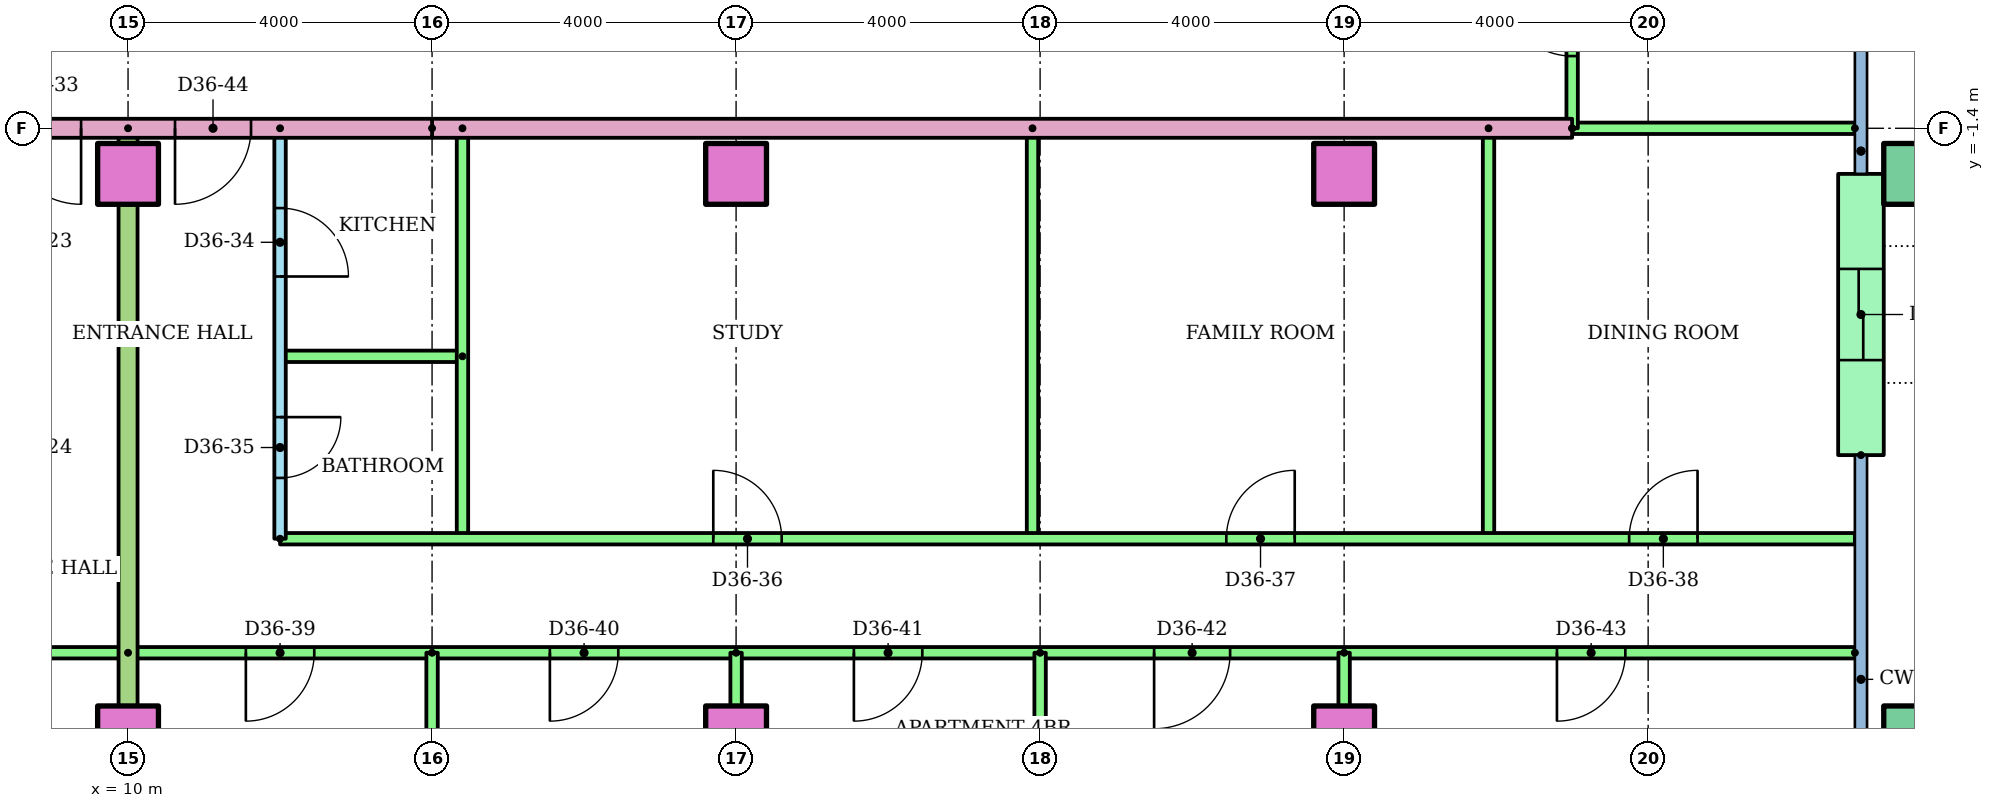
"""IFC4 building model, lengths in metres.
Left out: names, types, materials, properties, quantities, classifications, styles, units other than length and angle.
Written with IfcOpenShell. Run it as: python <this file> out.ifc"""

import sys

from ifc_helpers import new_model, si_unit, direction, frame, frame_2d, origin, origin_2d, place, context, subcontext, project, spatial, rectangle, hollow_rectangle, extrude, element, fill, save


model = new_model("IFC4")
c1 = context("Model", 3, precision=1e-05, world=origin(), true_north=direction((0.0, 1.0)))
c2 = subcontext(c1, "Body", "Model", "MODEL_VIEW")
j1 = project(units=[si_unit("LENGTHUNIT", "METRE"), si_unit("PLANEANGLEUNIT", "RADIAN")], contexts=[c1])
p1 = place(None, origin())
s1 = spatial("IfcSite", under=j1, at=p1, CompositionType="ELEMENT")
p2 = place(p1, origin())
s2 = spatial("IfcBuilding", under=s1, at=p2, CompositionType="ELEMENT")
p3 = place(p2, frame((0.0, 0.0, 139.0)))
s3 = spatial("IfcBuildingStorey", under=s2, at=p3, CompositionType="ELEMENT", Elevation=139.0)
for number, where in (
    (1, (10.0, -9.4, 0.0)),
    (2, (18.0, -9.4, 0.0)),
    (3, (26.0, -9.4, 0.0)),
):
    element("IfcColumn", number, at=place(p3, frame(where)), inside=s3, PredefinedType="COLUMN", context=c2, shape_type="SweptSolid", body=[
        extrude(rectangle(XDim=0.8, YDim=0.8, at=origin_2d()), origin(), (0.0, 0.0, 1.0), 3.2),
    ])
p4 = place(p3, frame((33.5, -9.4, 0.0)))
e4 = element("IfcColumn", 4, at=p4, inside=s3, PredefinedType="COLUMN", context=c2, shape_type="SweptSolid", body=[
    extrude(hollow_rectangle(XDim=0.8, YDim=0.8, WallThickness=0.04, at=origin_2d()), origin(), (0.0, 0.0, 1.0), 3.2),
])
for number, where in (
    (5, (10.0, -2.0, 0.0)),
    (6, (18.0, -2.0, 0.0)),
    (7, (26.0, -2.0, 0.0)),
):
    element("IfcColumn", number, at=place(p3, frame(where)), inside=s3, PredefinedType="COLUMN", context=c2, shape_type="SweptSolid", body=[
        extrude(rectangle(XDim=0.8, YDim=0.8, at=origin_2d()), origin(), (0.0, 0.0, 1.0), 3.2),
    ])
p5 = place(p3, frame((33.5, -2.0, 0.0)))
e8 = element("IfcColumn", 8, at=p5, inside=s3, PredefinedType="COLUMN", context=c2, shape_type="SweptSolid", body=[
    extrude(hollow_rectangle(XDim=0.8, YDim=0.8, WallThickness=0.04, at=origin_2d()), origin(), (0.0, 0.0, 1.0), 3.2),
])
p6 = place(p3, frame((32.8, -5.7, 0.0), z_axis=(0.0, 0.0, 1.0), x_axis=(0.0, 1.0, 0.0)))
e9 = element("IfcWall", 9, at=p6, inside=s3, PredefinedType="STANDARD", context=c2, shape_type="SweptSolid", body=[
    extrude(rectangle(XDim=3.7, YDim=0.6, at=frame_2d((1.85, 0.0))), origin(), (0.0, 0.0, 1.0), 2.92),
])
p7 = place(p6, frame((1.25, 0.0, 0.0)))
e10 = element("IfcOpeningElement", 10, at=p7, cuts=e9, PredefinedType="OPENING", context=c2, shape_type="SweptSolid", body=[
    extrude(rectangle(XDim=1.2, YDim=2.1, at=frame_2d((0.6, 1.05))), frame((0.0, 0.31, 0.0), z_axis=(0.0, -1.0, 0.0), x_axis=(1.0, 0.0, 0.0)), (0.0, 0.0, 1.0), 0.62),
])
p8 = place(p3, frame((10.0, -8.3, 0.0), z_axis=(0.0, 0.0, 1.0), x_axis=(-1.0, 0.0, 0.0)))
e11 = element("IfcWall", 11, at=p8, inside=s3, PredefinedType="PARTITIONING", context=c2, shape_type="SweptSolid", body=[
    extrude(rectangle(XDim=24.0, YDim=0.15, at=frame_2d((12.0, 0.0))), origin(), (0.0, 0.0, 1.0), 2.4),
])
p9 = place(p8, frame((19.5, 0.0, 0.0)))
e12 = element("IfcOpeningElement", 12, at=p9, cuts=e11, PredefinedType="OPENING", context=c2, shape_type="SweptSolid", body=[
    extrude(rectangle(XDim=1.0, YDim=2.1, at=frame_2d((0.5, 1.05))), frame((0.0, 0.085, 0.0), z_axis=(0.0, -1.0, 0.0), x_axis=(1.0, 0.0, 0.0)), (0.0, 0.0, 1.0), 0.17),
])
p10 = place(p8, frame((13.55, 0.0, 0.0)))
e13 = element("IfcOpeningElement", 13, at=p10, cuts=e11, PredefinedType="OPENING", context=c2, shape_type="SweptSolid", body=[
    extrude(rectangle(XDim=0.9, YDim=2.1, at=frame_2d((0.45, 1.05))), frame((0.0, 0.085, 0.0), z_axis=(0.0, -1.0, 0.0), x_axis=(1.0, 0.0, 0.0)), (0.0, 0.0, 1.0), 0.17),
])
p11 = place(p8, frame((9.55, 0.0, 0.0)))
e14 = element("IfcOpeningElement", 14, at=p11, cuts=e11, PredefinedType="OPENING", context=c2, shape_type="SweptSolid", body=[
    extrude(rectangle(XDim=0.9, YDim=2.1, at=frame_2d((0.45, 1.05))), frame((0.0, 0.085, 0.0), z_axis=(0.0, -1.0, 0.0), x_axis=(1.0, 0.0, 0.0)), (0.0, 0.0, 1.0), 0.17),
])
p12 = place(p8, frame((5.55, 0.0, 0.0)))
e15 = element("IfcOpeningElement", 15, at=p12, cuts=e11, PredefinedType="OPENING", context=c2, shape_type="SweptSolid", body=[
    extrude(rectangle(XDim=0.9, YDim=2.1, at=frame_2d((0.45, 1.05))), frame((0.0, 0.085, 0.0), z_axis=(0.0, -1.0, 0.0), x_axis=(1.0, 0.0, 0.0)), (0.0, 0.0, 1.0), 0.17),
])
p13 = place(p8, frame((1.55, 0.0, 0.0)))
e16 = element("IfcOpeningElement", 16, at=p13, cuts=e11, PredefinedType="OPENING", context=c2, shape_type="SweptSolid", body=[
    extrude(rectangle(XDim=0.9, YDim=2.1, at=frame_2d((0.45, 1.05))), frame((0.0, 0.085, 0.0), z_axis=(0.0, -1.0, 0.0), x_axis=(1.0, 0.0, 0.0)), (0.0, 0.0, 1.0), 0.17),
])
p14 = place(p3, frame((12.0, -1.4, 0.0), z_axis=(0.0, 0.0, 1.0), x_axis=(0.0, -1.0, 0.0)))
e17 = element("IfcWall", 17, at=p14, inside=s3, PredefinedType="PARTITIONING", context=c2, shape_type="SweptSolid", body=[
    extrude(rectangle(XDim=5.4, YDim=0.15, at=frame_2d((2.7, 0.0))), origin(), (0.0, 0.0, 1.0), 2.4),
])
p15 = place(p14, frame((1.05, 0.0, 0.0)))
e18 = element("IfcOpeningElement", 18, at=p15, cuts=e17, PredefinedType="OPENING", context=c2, shape_type="SweptSolid", body=[
    extrude(rectangle(XDim=0.9, YDim=2.1, at=frame_2d((0.45, 1.05))), frame((0.0, 0.085, 0.0), z_axis=(0.0, -1.0, 0.0), x_axis=(1.0, 0.0, 0.0)), (0.0, 0.0, 1.0), 0.17),
])
p16 = place(p14, frame((3.8, 0.0, 0.0)))
e19 = element("IfcOpeningElement", 19, at=p16, cuts=e17, PredefinedType="OPENING", context=c2, shape_type="SweptSolid", body=[
    extrude(rectangle(XDim=0.8, YDim=2.1, at=frame_2d((0.4, 1.05))), frame((0.0, 0.085, 0.0), z_axis=(0.0, -1.0, 0.0), x_axis=(1.0, 0.0, 0.0)), (0.0, 0.0, 1.0), 0.17),
])
p17 = place(p3, frame((14.4, -4.4, 0.0), z_axis=(0.0, 0.0, 1.0), x_axis=(-1.0, 0.0, 0.0)))
e20 = element("IfcWall", 20, at=p17, inside=s3, PredefinedType="PARTITIONING", context=c2, shape_type="SweptSolid", body=[
    extrude(rectangle(XDim=2.4, YDim=0.15, at=frame_2d((1.2, 0.0))), origin(), (0.0, 0.0, 1.0), 2.4),
])
for number, where, z_axis, x_axis in (
    (21, (14.4, -1.4, 0.0), (0.0, 0.0, 1.0), (0.0, -1.0, 0.0)),
    (22, (21.9, -1.4, 0.0), (0.0, 0.0, 1.0), (0.0, -1.0, 0.0)),
    (23, (27.9, -1.4, 0.0), (0.0, 0.0, 1.0), (0.0, -1.0, 0.0)),
):
    element("IfcWall", number, at=place(p3, frame(where, z_axis=z_axis, x_axis=x_axis)), inside=s3, PredefinedType="PARTITIONING", context=c2, shape_type="SweptSolid", body=[
        extrude(rectangle(XDim=5.4, YDim=0.15, at=frame_2d((2.7, 0.0))), origin(), (0.0, 0.0, 1.0), 2.4),
    ])
p18 = place(p3, frame((12.0, -6.8, 0.0)))
e24 = element("IfcWall", 24, at=p18, inside=s3, PredefinedType="PARTITIONING", context=c2, shape_type="SweptSolid", body=[
    extrude(rectangle(XDim=20.72, YDim=0.15, at=frame_2d((10.36, 0.0))), origin(), (0.0, 0.0, 1.0), 2.4),
])
p19 = place(p18, frame((5.7, 0.0, 0.0)))
e25 = element("IfcOpeningElement", 25, at=p19, cuts=e24, PredefinedType="OPENING", context=c2, shape_type="SweptSolid", body=[
    extrude(rectangle(XDim=0.9, YDim=2.1, at=frame_2d((0.45, 1.05))), frame((0.0, 0.085, 0.0), z_axis=(0.0, -1.0, 0.0), x_axis=(1.0, 0.0, 0.0)), (0.0, 0.0, 1.0), 0.17),
])
p20 = place(p18, frame((12.45, 0.0, 0.0)))
e26 = element("IfcOpeningElement", 26, at=p20, cuts=e24, PredefinedType="OPENING", context=c2, shape_type="SweptSolid", body=[
    extrude(rectangle(XDim=0.9, YDim=2.1, at=frame_2d((0.45, 1.05))), frame((0.0, 0.085, 0.0), z_axis=(0.0, -1.0, 0.0), x_axis=(1.0, 0.0, 0.0)), (0.0, 0.0, 1.0), 0.17),
])
p21 = place(p18, frame((17.75, 0.0, 0.0)))
e27 = element("IfcOpeningElement", 27, at=p21, cuts=e24, PredefinedType="OPENING", context=c2, shape_type="SweptSolid", body=[
    extrude(rectangle(XDim=0.9, YDim=2.1, at=frame_2d((0.45, 1.05))), frame((0.0, 0.085, 0.0), z_axis=(0.0, -1.0, 0.0), x_axis=(1.0, 0.0, 0.0)), (0.0, 0.0, 1.0), 0.17),
])
p22 = place(p3, frame((32.72, -8.3, 0.0), z_axis=(0.0, 0.0, 1.0), x_axis=(-1.0, 0.0, 0.0)))
e28 = element("IfcWall", 28, at=p22, inside=s3, PredefinedType="PARTITIONING", context=c2, shape_type="SweptSolid", body=[
    extrude(rectangle(XDim=22.72, YDim=0.15, at=frame_2d((11.36, 0.0))), origin(), (0.0, 0.0, 1.0), 2.4),
])
p23 = place(p22, frame((20.27, 0.0, 0.0)))
e29 = element("IfcOpeningElement", 29, at=p23, cuts=e28, PredefinedType="OPENING", context=c2, shape_type="SweptSolid", body=[
    extrude(rectangle(XDim=0.9, YDim=2.1, at=frame_2d((0.45, 1.05))), frame((0.0, 0.085, 0.0), z_axis=(0.0, -1.0, 0.0), x_axis=(1.0, 0.0, 0.0)), (0.0, 0.0, 1.0), 0.17),
])
p24 = place(p22, frame((16.27, 0.0, 0.0)))
e30 = element("IfcOpeningElement", 30, at=p24, cuts=e28, PredefinedType="OPENING", context=c2, shape_type="SweptSolid", body=[
    extrude(rectangle(XDim=0.9, YDim=2.1, at=frame_2d((0.45, 1.05))), frame((0.0, 0.085, 0.0), z_axis=(0.0, -1.0, 0.0), x_axis=(1.0, 0.0, 0.0)), (0.0, 0.0, 1.0), 0.17),
])
p25 = place(p22, frame((12.27, 0.0, 0.0)))
e31 = element("IfcOpeningElement", 31, at=p25, cuts=e28, PredefinedType="OPENING", context=c2, shape_type="SweptSolid", body=[
    extrude(rectangle(XDim=0.9, YDim=2.1, at=frame_2d((0.45, 1.05))), frame((0.0, 0.085, 0.0), z_axis=(0.0, -1.0, 0.0), x_axis=(1.0, 0.0, 0.0)), (0.0, 0.0, 1.0), 0.17),
])
p26 = place(p22, frame((8.22, 0.0, 0.0)))
e32 = element("IfcOpeningElement", 32, at=p26, cuts=e28, PredefinedType="OPENING", context=c2, shape_type="SweptSolid", body=[
    extrude(rectangle(XDim=1.0, YDim=2.1, at=frame_2d((0.5, 1.05))), frame((0.0, 0.085, 0.0), z_axis=(0.0, -1.0, 0.0), x_axis=(1.0, 0.0, 0.0)), (0.0, 0.0, 1.0), 0.17),
])
p27 = place(p22, frame((3.02, 0.0, 0.0)))
e33 = element("IfcOpeningElement", 33, at=p27, cuts=e28, PredefinedType="OPENING", context=c2, shape_type="SweptSolid", body=[
    extrude(rectangle(XDim=0.9, YDim=2.1, at=frame_2d((0.45, 1.05))), frame((0.0, 0.085, 0.0), z_axis=(0.0, -1.0, 0.0), x_axis=(1.0, 0.0, 0.0)), (0.0, 0.0, 1.0), 0.17),
])
p28 = place(p3, frame((14.0, -8.3, 0.0), z_axis=(0.0, 0.0, 1.0), x_axis=(0.0, -1.0, 0.0)))
e34 = element("IfcWall", 34, at=p28, inside=s3, PredefinedType="PARTITIONING", context=c2, shape_type="SweptSolid", body=[
    extrude(rectangle(XDim=8.021, YDim=0.15, at=frame_2d((4.01, 0.0))), origin(), (0.0, 0.0, 1.0), 2.4),
])
p29 = place(p3, frame((18.0, -8.3, 0.0), z_axis=(0.0, 0.0, 1.0), x_axis=(0.0, -1.0, 0.0)))
e35 = element("IfcWall", 35, at=p29, inside=s3, PredefinedType="PARTITIONING", context=c2, shape_type="SweptSolid", body=[
    extrude(rectangle(XDim=8.01, YDim=0.15, at=frame_2d((4.005, 0.0))), origin(), (0.0, 0.0, 1.0), 2.4),
])
p30 = place(p3, frame((22.0, -8.3, 0.0), z_axis=(0.0, 0.0, 1.0), x_axis=(0.0, -1.0, 0.0)))
e36 = element("IfcWall", 36, at=p30, inside=s3, PredefinedType="PARTITIONING", context=c2, shape_type="SweptSolid", body=[
    extrude(rectangle(XDim=8.021, YDim=0.15, at=frame_2d((4.01, 0.0))), origin(), (0.0, 0.0, 1.0), 2.4),
])
p31 = place(p3, frame((26.0, -8.3, 0.0), z_axis=(0.0, 0.0, 1.0), x_axis=(0.0, -1.0, 0.0)))
e37 = element("IfcWall", 37, at=p31, inside=s3, PredefinedType="PARTITIONING", context=c2, shape_type="SweptSolid", body=[
    extrude(rectangle(XDim=8.01, YDim=0.15, at=frame_2d((4.005, 0.0))), origin(), (0.0, 0.0, 1.0), 2.4),
])
p32 = place(p3, frame((10.0, -1.4, 0.0), z_axis=(0.0, 0.0, 1.0), x_axis=(0.0, -1.0, 0.0)))
e38 = element("IfcWall", 38, at=p32, inside=s3, PredefinedType="PARTITIONING", context=c2, shape_type="SweptSolid", body=[
    extrude(rectangle(XDim=14.91, YDim=0.25, at=frame_2d((7.455, 0.0))), origin(), (0.0, 0.0, 1.0), 2.4),
])
p33 = place(p3, frame((29.0, -1.4, 0.0), z_axis=(0.0, 0.0, 1.0), x_axis=(-1.0, 0.0, 0.0)))
e39 = element("IfcWall", 39, at=p33, inside=s3, PredefinedType="PARTITIONING", context=c2, shape_type="SweptSolid", body=[
    extrude(rectangle(XDim=15.0, YDim=0.25, at=frame_2d((7.5, 0.0))), origin(), (0.0, 0.0, 1.0), 2.4),
])
p34 = place(p3, frame((32.72, -1.4, 0.0), z_axis=(0.0, 0.0, 1.0), x_axis=(-1.0, 0.0, 0.0)))
e40 = element("IfcWall", 40, at=p34, inside=s3, PredefinedType="PARTITIONING", context=c2, shape_type="SweptSolid", body=[
    extrude(rectangle(XDim=3.72, YDim=0.15, at=frame_2d((1.86, 0.0))), origin(), (0.0, 0.0, 1.0), 2.4),
])
p35 = place(p3, frame((29.0, -1.4, 0.0), z_axis=(0.0, 0.0, 1.0), x_axis=(0.0, 1.0, 0.0)))
e41 = element("IfcWall", 41, at=p35, inside=s3, PredefinedType="PARTITIONING", context=c2, shape_type="SweptSolid", body=[
    extrude(rectangle(XDim=2.8, YDim=0.15, at=frame_2d((1.4, 0.0))), origin(), (0.0, 0.0, 1.0), 2.4),
])
p36 = place(p35, frame((0.95, 0.0, 0.0)))
e42 = element("IfcOpeningElement", 42, at=p36, cuts=e41, PredefinedType="OPENING", context=c2, shape_type="SweptSolid", body=[
    extrude(rectangle(XDim=0.9, YDim=2.1, at=frame_2d((0.45, 1.05))), frame((0.0, 0.085, 0.0), z_axis=(0.0, -1.0, 0.0), x_axis=(1.0, 0.0, 0.0)), (0.0, 0.0, 1.0), 0.17),
])
p37 = place(p3, frame((14.0, -1.4, 0.0), z_axis=(0.0, 0.0, 1.0), x_axis=(-1.0, 0.0, 0.0)))
e43 = element("IfcWall", 43, at=p37, inside=s3, PredefinedType="PARTITIONING", context=c2, shape_type="SweptSolid", body=[
    extrude(rectangle(XDim=28.0, YDim=0.25, at=frame_2d((14.0, 0.0))), origin(), (0.0, 0.0, 1.0), 2.4),
])
p38 = place(p37, frame((4.618, 0.0, 0.0)))
e44 = element("IfcOpeningElement", 44, at=p38, cuts=e43, PredefinedType="OPENING", context=c2, shape_type="SweptSolid", body=[
    extrude(rectangle(XDim=1.0, YDim=2.1, at=frame_2d((0.5, 1.05))), frame((0.0, 0.135, 0.0), z_axis=(0.0, -1.0, 0.0), x_axis=(1.0, 0.0, 0.0)), (0.0, 0.0, 1.0), 0.27),
])
p39 = place(p37, frame((2.382, 0.0, 0.0)))
e45 = element("IfcOpeningElement", 45, at=p39, cuts=e43, PredefinedType="OPENING", context=c2, shape_type="SweptSolid", body=[
    extrude(rectangle(XDim=1.0, YDim=2.1, at=frame_2d((0.5, 1.05))), frame((0.0, 0.135, 0.0), z_axis=(0.0, -1.0, 0.0), x_axis=(1.0, 0.0, 0.0)), (0.0, 0.0, 1.0), 0.27),
])
p40 = place(p38, origin())
e46 = element("IfcDoor", 46, at=p40, inside=s3, OperationType="SINGLE_SWING_LEFT", PredefinedType="DOOR", context=c2, shape_type="SweptSolid", body=[
    extrude(rectangle(XDim=1.0, YDim=2.1, at=frame_2d((0.5, 1.05))), frame((0.0, 0.025, 0.0), z_axis=(0.0, -1.0, 0.0), x_axis=(1.0, 0.0, 0.0)), (0.0, 0.0, 1.0), 0.05),
])
fill(e44, e46)
p41 = place(p15, origin())
e47 = element("IfcDoor", 47, at=p41, inside=s3, OperationType="SINGLE_SWING_RIGHT", PredefinedType="DOOR", context=c2, shape_type="SweptSolid", body=[
    extrude(rectangle(XDim=0.9, YDim=2.1, at=frame_2d((0.45, 1.05))), frame((0.0, 0.025, 0.0), z_axis=(0.0, -1.0, 0.0), x_axis=(1.0, 0.0, 0.0)), (0.0, 0.0, 1.0), 0.05),
])
fill(e18, e47)
p42 = place(p16, origin())
e48 = element("IfcDoor", 48, at=p42, inside=s3, OperationType="SINGLE_SWING_LEFT", PredefinedType="DOOR", context=c2, shape_type="SweptSolid", body=[
    extrude(rectangle(XDim=0.8, YDim=2.1, at=frame_2d((0.4, 1.05))), frame((0.0, 0.025, 0.0), z_axis=(0.0, -1.0, 0.0), x_axis=(1.0, 0.0, 0.0)), (0.0, 0.0, 1.0), 0.05),
])
fill(e19, e48)
p43 = place(p19, origin())
e49 = element("IfcDoor", 49, at=p43, inside=s3, OperationType="SINGLE_SWING_LEFT", PredefinedType="DOOR", context=c2, shape_type="SweptSolid", body=[
    extrude(rectangle(XDim=0.9, YDim=2.1, at=frame_2d((0.45, 1.05))), frame((0.0, 0.025, 0.0), z_axis=(0.0, -1.0, 0.0), x_axis=(1.0, 0.0, 0.0)), (0.0, 0.0, 1.0), 0.05),
])
fill(e25, e49)
p44 = place(p20, origin())
e50 = element("IfcDoor", 50, at=p44, inside=s3, OperationType="SINGLE_SWING_RIGHT", PredefinedType="DOOR", context=c2, shape_type="SweptSolid", body=[
    extrude(rectangle(XDim=0.9, YDim=2.1, at=frame_2d((0.45, 1.05))), frame((0.0, 0.025, 0.0), z_axis=(0.0, -1.0, 0.0), x_axis=(1.0, 0.0, 0.0)), (0.0, 0.0, 1.0), 0.05),
])
fill(e26, e50)
p45 = place(p21, origin())
e51 = element("IfcDoor", 51, at=p45, inside=s3, OperationType="SINGLE_SWING_RIGHT", PredefinedType="DOOR", context=c2, shape_type="SweptSolid", body=[
    extrude(rectangle(XDim=0.9, YDim=2.1, at=frame_2d((0.45, 1.05))), frame((0.0, 0.025, 0.0), z_axis=(0.0, -1.0, 0.0), x_axis=(1.0, 0.0, 0.0)), (0.0, 0.0, 1.0), 0.05),
])
fill(e27, e51)
p46 = place(p23, origin())
e52 = element("IfcDoor", 52, at=p46, inside=s3, OperationType="SINGLE_SWING_RIGHT", PredefinedType="DOOR", context=c2, shape_type="SweptSolid", body=[
    extrude(rectangle(XDim=0.9, YDim=2.1, at=frame_2d((0.45, 1.05))), frame((0.0, 0.025, 0.0), z_axis=(0.0, -1.0, 0.0), x_axis=(1.0, 0.0, 0.0)), (0.0, 0.0, 1.0), 0.05),
])
fill(e29, e52)
p47 = place(p24, origin())
e53 = element("IfcDoor", 53, at=p47, inside=s3, OperationType="SINGLE_SWING_RIGHT", PredefinedType="DOOR", context=c2, shape_type="SweptSolid", body=[
    extrude(rectangle(XDim=0.9, YDim=2.1, at=frame_2d((0.45, 1.05))), frame((0.0, 0.025, 0.0), z_axis=(0.0, -1.0, 0.0), x_axis=(1.0, 0.0, 0.0)), (0.0, 0.0, 1.0), 0.05),
])
fill(e30, e53)
p48 = place(p25, origin())
e54 = element("IfcDoor", 54, at=p48, inside=s3, OperationType="SINGLE_SWING_RIGHT", PredefinedType="DOOR", context=c2, shape_type="SweptSolid", body=[
    extrude(rectangle(XDim=0.9, YDim=2.1, at=frame_2d((0.45, 1.05))), frame((0.0, 0.025, 0.0), z_axis=(0.0, -1.0, 0.0), x_axis=(1.0, 0.0, 0.0)), (0.0, 0.0, 1.0), 0.05),
])
fill(e31, e54)
p49 = place(p26, origin())
e55 = element("IfcDoor", 55, at=p49, inside=s3, OperationType="SINGLE_SWING_RIGHT", PredefinedType="DOOR", context=c2, shape_type="SweptSolid", body=[
    extrude(rectangle(XDim=1.0, YDim=2.1, at=frame_2d((0.5, 1.05))), frame((0.0, 0.025, 0.0), z_axis=(0.0, -1.0, 0.0), x_axis=(1.0, 0.0, 0.0)), (0.0, 0.0, 1.0), 0.05),
])
fill(e32, e55)
p50 = place(p27, origin())
e56 = element("IfcDoor", 56, at=p50, inside=s3, OperationType="SINGLE_SWING_RIGHT", PredefinedType="DOOR", context=c2, shape_type="SweptSolid", body=[
    extrude(rectangle(XDim=0.9, YDim=2.1, at=frame_2d((0.45, 1.05))), frame((0.0, 0.025, 0.0), z_axis=(0.0, -1.0, 0.0), x_axis=(1.0, 0.0, 0.0)), (0.0, 0.0, 1.0), 0.05),
])
fill(e33, e56)
p51 = place(p39, origin())
e57 = element("IfcDoor", 57, at=p51, inside=s3, OperationType="SINGLE_SWING_RIGHT", PredefinedType="DOOR", context=c2, shape_type="SweptSolid", body=[
    extrude(rectangle(XDim=1.0, YDim=2.1, at=frame_2d((0.5, 1.05))), frame((0.0, 0.025, 0.0), z_axis=(0.0, -1.0, 0.0), x_axis=(1.0, 0.0, 0.0)), (0.0, 0.0, 1.0), 0.05),
])
fill(e45, e57)
p52 = place(p36, origin())
e58 = element("IfcDoor", 58, at=p52, inside=s3, OperationType="SINGLE_SWING_RIGHT", PredefinedType="DOOR", context=c2, shape_type="SweptSolid", body=[
    extrude(rectangle(XDim=0.9, YDim=2.1, at=frame_2d((0.45, 1.05))), frame((0.0, 0.025, 0.0), z_axis=(0.0, -1.0, 0.0), x_axis=(1.0, 0.0, 0.0)), (0.0, 0.0, 1.0), 0.05),
])
fill(e42, e58)
p53 = place(p7, origin())
e59 = element("IfcDoor", 59, at=p53, inside=s3, OperationType="SLIDING_TO_LEFT", PredefinedType="DOOR", context=c2, shape_type="SweptSolid", body=[
    extrude(rectangle(XDim=1.2, YDim=2.1, at=frame_2d((0.6, 1.05))), frame((0.0, 0.025, 0.0), z_axis=(0.0, -1.0, 0.0), x_axis=(1.0, 0.0, 0.0)), (0.0, 0.0, 1.0), 0.05),
])
fill(e10, e59)
save(model, sys.argv[1])
